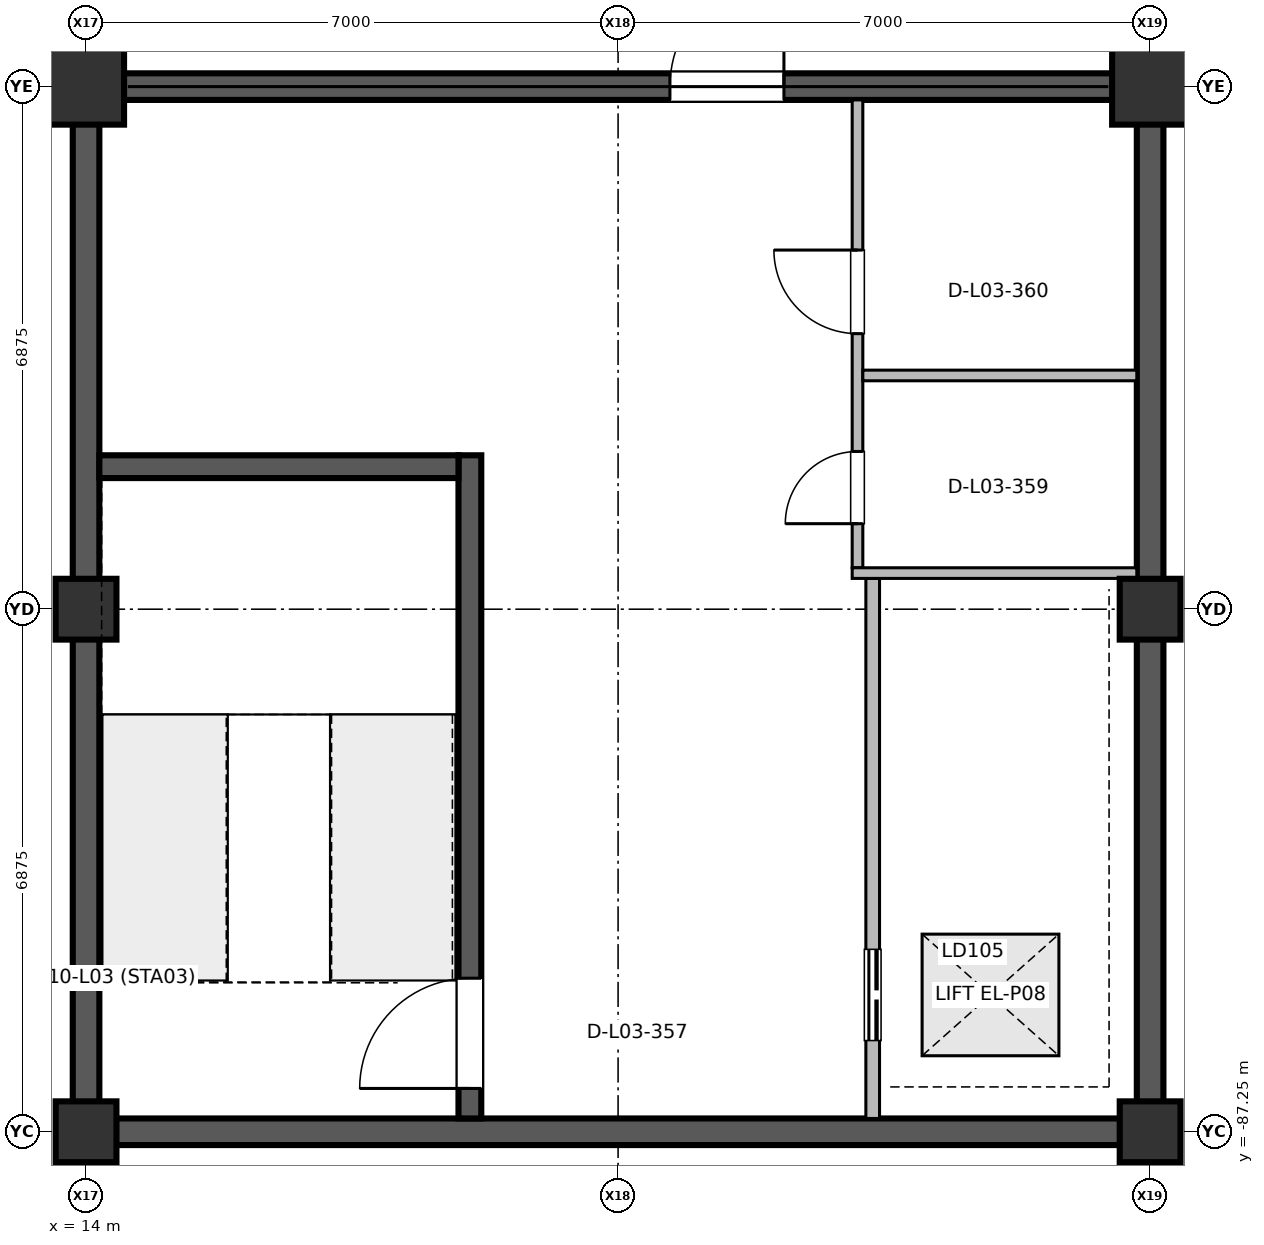
"""IFC4 building model, lengths in metres.
Left out: names, types, materials, properties, quantities, classifications, styles, units other than length and angle.
Written with IfcOpenShell. Run it as: python <this file> out.ifc"""

import sys

from ifc_helpers import new_model, si_unit, direction, frame, frame_2d, origin, origin_2d, place, context, subcontext, project, spatial, rectangle, extrude, element, fill, save


model = new_model("IFC4")
c1 = context("Model", 3, precision=1e-05, world=origin(), true_north=direction((0.0, 1.0)))
c2 = subcontext(c1, "Body", "Model", "MODEL_VIEW")
j1 = project(units=[si_unit("LENGTHUNIT", "METRE"), si_unit("PLANEANGLEUNIT", "RADIAN")], contexts=[c1])
p1 = place(None, origin())
s1 = spatial("IfcSite", under=j1, at=p1, CompositionType="ELEMENT")
p2 = place(p1, origin())
s2 = spatial("IfcBuilding", under=s1, at=p2, CompositionType="ELEMENT")
p3 = place(p2, frame((0.0, 0.0, 11.4)))
s3 = spatial("IfcBuildingStorey", under=s2, at=p3, CompositionType="ELEMENT", Elevation=11.4)
for number, where, z_axis, x_axis in (
    (1, (14.0, -87.25, 0.0), (0.0, 0.0, 1.0), (1.0, 0.0, 0.0)),
    (2, (14.0, -80.375, 0.0), (0.0, 0.0, 1.0), (1.0, 0.0, 0.0)),
):
    element("IfcColumn", number, at=place(p3, frame(where, z_axis=z_axis, x_axis=x_axis)), inside=s3, PredefinedType="COLUMN", context=c2, shape_type="SweptSolid", body=[
        extrude(rectangle(XDim=0.8, YDim=0.8, at=origin_2d()), origin(), (0.0, 0.0, 1.0), 4.798),
    ])
p4 = place(p3, frame((14.0, -73.5, 0.0), z_axis=(0.0, 0.0, 1.0), x_axis=(1.0, 0.0, 0.0)))
e3 = element("IfcColumn", 3, at=p4, inside=s3, PredefinedType="COLUMN", context=c2, shape_type="SweptSolid", body=[
    extrude(rectangle(XDim=1.0, YDim=1.0, at=origin_2d()), origin(), (0.0, 0.0, 1.0), 4.798),
])
for number, where, z_axis, x_axis in (
    (4, (28.0, -87.25, 0.0), (0.0, 0.0, 1.0), (1.0, 0.0, 0.0)),
    (5, (28.0, -80.375, 0.0), (0.0, 0.0, 1.0), (1.0, 0.0, 0.0)),
):
    element("IfcColumn", number, at=place(p3, frame(where, z_axis=z_axis, x_axis=x_axis)), inside=s3, PredefinedType="COLUMN", context=c2, shape_type="SweptSolid", body=[
        extrude(rectangle(XDim=0.8, YDim=0.8, at=origin_2d()), origin(), (0.0, 0.0, 1.0), 4.798),
    ])
p5 = place(p3, frame((28.0, -73.5, 0.0), z_axis=(0.0, 0.0, 1.0), x_axis=(1.0, 0.0, 0.0)))
e6 = element("IfcColumn", 6, at=p5, inside=s3, PredefinedType="COLUMN", context=c2, shape_type="SweptSolid", body=[
    extrude(rectangle(XDim=1.0, YDim=1.0, at=origin_2d()), origin(), (0.0, 0.0, 1.0), 4.798),
])
for number, where, z_axis, x_axis in (
    (7, (14.0, -87.075, 0.0), (0.0, 0.0, 1.0), (0.0, 1.0, 0.0)),
    (8, (28.0, -87.075, 0.0), (0.0, 0.0, 1.0), (0.0, 1.0, 0.0)),
):
    element("IfcWall", number, at=place(p3, frame(where, z_axis=z_axis, x_axis=x_axis)), inside=s3, PredefinedType="SHEAR", context=c2, shape_type="SweptSolid", body=[
        extrude(rectangle(XDim=13.4, YDim=0.35, at=frame_2d((6.7, 0.0))), origin(), (0.0, 0.0, 1.0), 4.62),
    ])
p6 = place(p3, frame((14.175, -87.25, 0.0), z_axis=(0.0, 0.0, 1.0), x_axis=(1.0, 0.0, 0.0)))
e9 = element("IfcWall", 9, at=p6, inside=s3, PredefinedType="SHEAR", context=c2, shape_type="SweptSolid", body=[
    extrude(rectangle(XDim=13.65, YDim=0.35, at=frame_2d((6.825, 0.0))), origin(), (0.0, 0.0, 1.0), 4.62),
])
p7 = place(p3, frame((14.175, -73.5, 0.0), z_axis=(0.0, 0.0, 1.0), x_axis=(1.0, 0.0, 0.0)))
e10 = element("IfcWall", 10, at=p7, inside=s3, PredefinedType="SHEAR", context=c2, shape_type="SweptSolid", body=[
    extrude(rectangle(XDim=13.65, YDim=0.35, at=frame_2d((6.825, 0.0))), origin(), (0.0, 0.0, 1.0), 4.62),
])
p8 = place(p7, frame((7.507, 0.0, 0.0)))
e11 = element("IfcOpeningElement", 11, at=p8, cuts=e10, PredefinedType="OPENING", context=c2, shape_type="SweptSolid", body=[
    extrude(rectangle(XDim=1.5, YDim=2.2, at=frame_2d((0.75, 1.1))), frame((0.0, 0.185, 0.0), z_axis=(0.0, -1.0, 0.0), x_axis=(1.0, 0.0, 0.0)), (0.0, 0.0, 1.0), 0.37),
])
p9 = place(p3, frame((19.05, -87.075, 0.0), z_axis=(0.0, 0.0, 1.0), x_axis=(0.0, 1.0, 0.0)))
e12 = element("IfcWall", 12, at=p9, inside=s3, PredefinedType="SHEAR", context=c2, shape_type="SweptSolid", body=[
    extrude(rectangle(XDim=8.725, YDim=0.3, at=frame_2d((4.362, 0.0))), origin(), (0.0, 0.0, 1.0), 4.62),
])
p10 = place(p9, frame((0.395, 0.0, 0.0)))
e13 = element("IfcOpeningElement", 13, at=p10, cuts=e12, PredefinedType="OPENING", context=c2, shape_type="SweptSolid", body=[
    extrude(rectangle(XDim=1.45, YDim=2.2, at=frame_2d((0.725, 1.1))), frame((0.0, 0.16, 0.0), z_axis=(0.0, -1.0, 0.0), x_axis=(1.0, 0.0, 0.0)), (0.0, 0.0, 1.0), 0.32),
])
p11 = place(p3, frame((24.35, -87.075, 0.0), z_axis=(0.0, 0.0, 1.0), x_axis=(0.0, 1.0, 0.0)))
e14 = element("IfcWall", 14, at=p11, inside=s3, PredefinedType="PARTITIONING", context=c2, shape_type="SweptSolid", body=[
    extrude(rectangle(XDim=7.105, YDim=0.18, at=frame_2d((3.552, 0.0))), origin(), (0.0, 0.0, 1.0), 3.82),
])
p12 = place(p11, frame((1.025, 0.0, 0.0)))
e15 = element("IfcOpeningElement", 15, at=p12, cuts=e14, PredefinedType="OPENING", context=c2, shape_type="SweptSolid", body=[
    extrude(rectangle(XDim=1.2, YDim=2.25, at=frame_2d((0.6, 1.125))), frame((0.0, 0.1, 0.0), z_axis=(0.0, -1.0, 0.0), x_axis=(1.0, 0.0, 0.0)), (0.0, 0.0, 1.0), 0.2),
])
p13 = place(p3, frame((24.15, -79.83, 0.0), z_axis=(0.0, 0.0, 1.0), x_axis=(0.0, 1.0, 0.0)))
e16 = element("IfcWall", 16, at=p13, inside=s3, PredefinedType="PARTITIONING", context=c2, shape_type="SweptSolid", body=[
    extrude(rectangle(XDim=6.155, YDim=0.14, at=frame_2d((3.078, 0.0))), origin(), (0.0, 0.0, 1.0), 3.82),
])
p14 = place(p13, frame((0.58, 0.0, 0.0)))
e17 = element("IfcOpeningElement", 17, at=p14, cuts=e16, PredefinedType="OPENING", context=c2, shape_type="SweptSolid", body=[
    extrude(rectangle(XDim=0.95, YDim=2.15, at=frame_2d((0.475, 1.075))), frame((0.0, 0.08, 0.0), z_axis=(0.0, -1.0, 0.0), x_axis=(1.0, 0.0, 0.0)), (0.0, 0.0, 1.0), 0.16),
])
p15 = place(p13, frame((3.08, 0.0, 0.0)))
e18 = element("IfcOpeningElement", 18, at=p15, cuts=e16, PredefinedType="OPENING", context=c2, shape_type="SweptSolid", body=[
    extrude(rectangle(XDim=1.1, YDim=2.15, at=frame_2d((0.55, 1.075))), frame((0.0, 0.08, 0.0), z_axis=(0.0, -1.0, 0.0), x_axis=(1.0, 0.0, 0.0)), (0.0, 0.0, 1.0), 0.16),
])
p16 = place(p3, frame((24.08, -79.9, 0.0), z_axis=(0.0, 0.0, 1.0), x_axis=(1.0, 0.0, 0.0)))
e19 = element("IfcWall", 19, at=p16, inside=s3, PredefinedType="PARTITIONING", context=c2, shape_type="SweptSolid", body=[
    extrude(rectangle(XDim=3.745, YDim=0.14, at=frame_2d((1.873, 0.0))), origin(), (0.0, 0.0, 1.0), 3.82),
])
p17 = place(p3, frame((24.22, -77.3, 0.0), z_axis=(0.0, 0.0, 1.0), x_axis=(1.0, 0.0, 0.0)))
e20 = element("IfcWall", 20, at=p17, inside=s3, PredefinedType="PARTITIONING", context=c2, shape_type="SweptSolid", body=[
    extrude(rectangle(XDim=3.605, YDim=0.14, at=frame_2d((1.802, 0.0))), origin(), (0.0, 0.0, 1.0), 3.82),
])
p18 = place(p3, frame((14.175, -78.5, 0.0), z_axis=(0.0, 0.0, 1.0), x_axis=(1.0, 0.0, 0.0)))
e21 = element("IfcWall", 21, at=p18, inside=s3, PredefinedType="SHEAR", context=c2, shape_type="SweptSolid", body=[
    extrude(rectangle(XDim=4.725, YDim=0.3, at=frame_2d((2.362, 0.0))), origin(), (0.0, 0.0, 1.0), 4.62),
])
p19 = place(p8, origin())
e22 = element("IfcDoor", 22, at=p19, inside=s3, OperationType="SINGLE_SWING_RIGHT", PredefinedType="DOOR", context=c2, shape_type="SweptSolid", body=[
    extrude(rectangle(XDim=1.5, YDim=2.2, at=frame_2d((0.75, 1.1))), frame((0.0, 0.025, 0.0), z_axis=(0.0, -1.0, 0.0), x_axis=(1.0, 0.0, 0.0)), (0.0, 0.0, 1.0), 0.05),
])
fill(e11, e22)
p20 = place(p10, origin())
e23 = element("IfcDoor", 23, at=p20, inside=s3, OperationType="SINGLE_SWING_LEFT", PredefinedType="DOOR", context=c2, shape_type="SweptSolid", body=[
    extrude(rectangle(XDim=1.45, YDim=2.2, at=frame_2d((0.725, 1.1))), frame((0.0, 0.025, 0.0), z_axis=(0.0, -1.0, 0.0), x_axis=(1.0, 0.0, 0.0)), (0.0, 0.0, 1.0), 0.05),
])
fill(e13, e23)
p21 = place(p12, origin())
e24 = element("IfcDoor", 24, at=p21, inside=s3, OperationType="DOUBLE_DOOR_SLIDING", PredefinedType="DOOR", context=c2, shape_type="SweptSolid", body=[
    extrude(rectangle(XDim=1.2, YDim=2.25, at=frame_2d((0.6, 1.125))), frame((0.0, 0.025, 0.0), z_axis=(0.0, -1.0, 0.0), x_axis=(1.0, 0.0, 0.0)), (0.0, 0.0, 1.0), 0.05),
])
fill(e15, e24)
p22 = place(p14, origin())
e25 = element("IfcDoor", 25, at=p22, inside=s3, OperationType="SINGLE_SWING_LEFT", PredefinedType="DOOR", context=c2, shape_type="SweptSolid", body=[
    extrude(rectangle(XDim=0.95, YDim=2.15, at=frame_2d((0.475, 1.075))), frame((0.0, 0.025, 0.0), z_axis=(0.0, -1.0, 0.0), x_axis=(1.0, 0.0, 0.0)), (0.0, 0.0, 1.0), 0.05),
])
fill(e17, e25)
p23 = place(p15, origin())
e26 = element("IfcDoor", 26, at=p23, inside=s3, OperationType="SINGLE_SWING_RIGHT", PredefinedType="DOOR", context=c2, shape_type="SweptSolid", body=[
    extrude(rectangle(XDim=1.1, YDim=2.15, at=frame_2d((0.55, 1.075))), frame((0.0, 0.025, 0.0), z_axis=(0.0, -1.0, 0.0), x_axis=(1.0, 0.0, 0.0)), (0.0, 0.0, 1.0), 0.05),
])
fill(e18, e26)
save(model, sys.argv[1])
